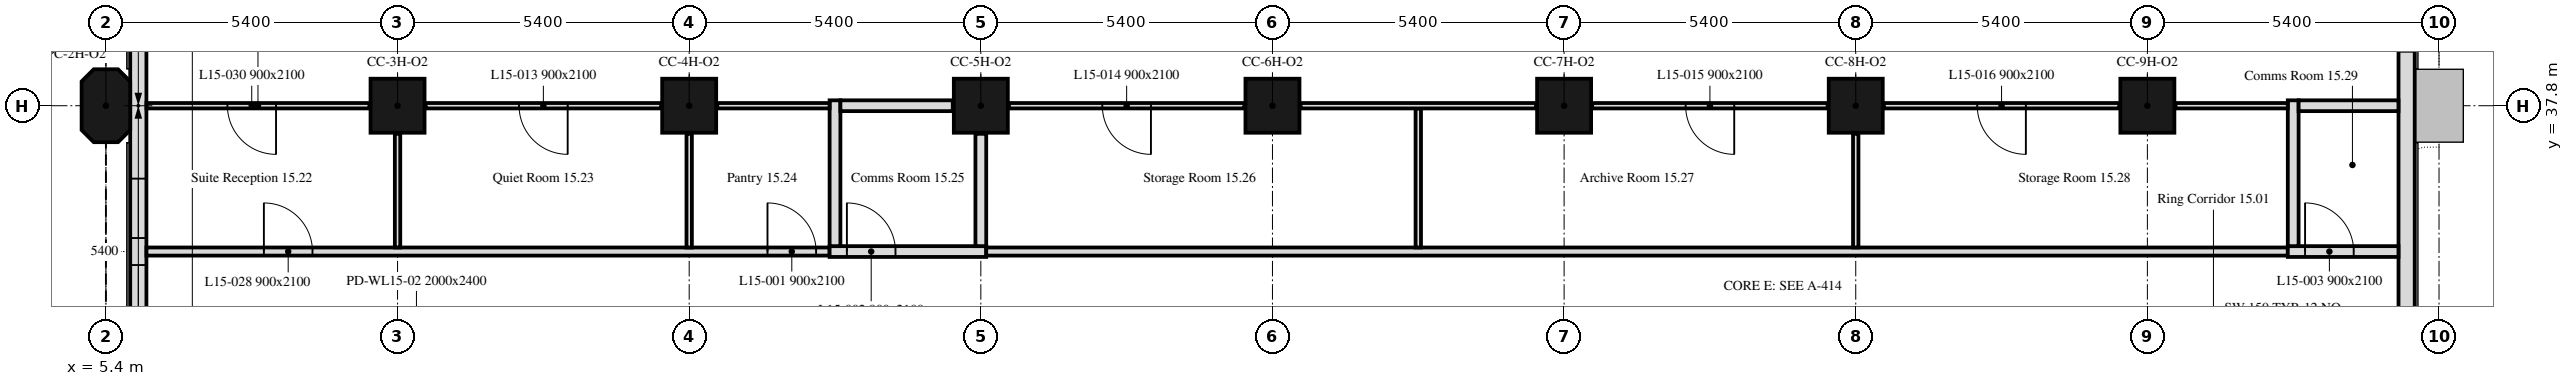
"""IFC4 building model, lengths in metres.
Left out: names, types, materials, properties, quantities, classifications, styles, units other than length and angle.
Written with IfcOpenShell. Run it as: python <this file> out.ifc"""

import sys

from ifc_helpers import new_model, si_unit, direction, frame, frame_2d, origin, origin_2d, place, context, subcontext, project, spatial, polyline, rectangle, outline, extrude, element, fill, save


model = new_model("IFC4")
c1 = context("Model", 3, precision=1e-05, world=origin(), true_north=direction((0.0, 1.0)))
c2 = subcontext(c1, "Body", "Model", "MODEL_VIEW")
j1 = project(units=[si_unit("LENGTHUNIT", "METRE"), si_unit("PLANEANGLEUNIT", "RADIAN")], contexts=[c1])
p1 = place(None, origin())
s1 = spatial("IfcSite", under=j1, at=p1, CompositionType="ELEMENT")
p2 = place(p1, origin())
s2 = spatial("IfcBuilding", under=s1, at=p2, CompositionType="ELEMENT")
p3 = place(p2, frame((0.0, 0.0, 68.8)))
s3 = spatial("IfcBuildingStorey", under=s2, at=p3, CompositionType="ELEMENT", Elevation=68.8)
p4 = place(p3, frame((5.4, 37.8, 0.0), z_axis=(0.0, 0.0, 1.0), x_axis=(0.0, 1.0, 0.0)))
e1 = element("IfcColumn", 1, at=p4, inside=s3, PredefinedType="COLUMN", context=c2, shape_type="SweptSolid", body=[
    extrude(outline(polyline([(-0.45, -0.45), (0.45, -0.45), (0.675, -0.225), (0.675, 0.225), (0.45, 0.45), (-0.45, 0.45), (-0.675, 0.225), (-0.675, -0.225), (-0.45, -0.45)])), origin(), (0.0, 0.0, 1.0), 3.5),
])
for number, where, z_axis, x_axis in (
    (2, (10.8, 37.8, 0.0), (0.0, 0.0, 1.0), (1.0, 0.0, 0.0)),
    (3, (16.2, 37.8, 0.0), (0.0, 0.0, 1.0), (1.0, 0.0, 0.0)),
    (4, (21.6, 37.8, 0.0), (0.0, 0.0, 1.0), (1.0, 0.0, 0.0)),
    (5, (27.0, 37.8, 0.0), (0.0, 0.0, 1.0), (1.0, 0.0, 0.0)),
    (6, (32.4, 37.8, 0.0), (0.0, 0.0, 1.0), (1.0, 0.0, 0.0)),
    (7, (37.8, 37.8, 0.0), (0.0, 0.0, 1.0), (1.0, 0.0, 0.0)),
    (8, (43.2, 37.8, 0.0), (0.0, 0.0, 1.0), (1.0, 0.0, 0.0)),
):
    element("IfcColumn", number, at=place(p3, frame(where, z_axis=z_axis, x_axis=x_axis)), inside=s3, PredefinedType="COLUMN", context=c2, shape_type="SweptSolid", body=[
        extrude(rectangle(XDim=1.0, YDim=1.0, at=origin_2d()), origin(), (0.0, 0.0, 1.0), 3.5),
    ])
p5 = place(p3, frame((48.0, 10.986, 0.0), z_axis=(0.0, 0.0, 1.0), x_axis=(0.0, 1.0, 0.0)))
e9 = element("IfcWall", 9, at=p5, inside=s3, PredefinedType="SOLIDWALL", context=c2, shape_type="SweptSolid", body=[
    extrude(rectangle(XDim=32.027, YDim=0.3, at=frame_2d((16.014, 0.0))), origin(), (0.0, 0.0, 1.0), 3.5),
])
p6 = place(p5, frame((27.814, 0.0, 0.9)))
e10 = element("IfcOpeningElement", 10, at=p6, cuts=e9, PredefinedType="OPENING", context=c2, shape_type="SweptSolid", body=[
    extrude(rectangle(XDim=3.4, YDim=1.7, at=frame_2d((1.7, 0.85))), frame((0.0, 0.16, 0.0), z_axis=(0.0, -1.0, 0.0), x_axis=(1.0, 0.0, 0.0)), (0.0, 0.0, 1.0), 0.32),
])
p7 = place(p3, frame((6.0, 43.014, 0.0), z_axis=(0.0, 0.0, 1.0), x_axis=(0.0, -1.0, 0.0)))
e11 = element("IfcWall", 11, at=p7, inside=s3, PredefinedType="SOLIDWALL", context=c2, shape_type="SweptSolid", body=[
    extrude(rectangle(XDim=10.614, YDim=0.3, at=frame_2d((5.307, 0.0))), origin(), (0.0, 0.0, 1.0), 3.5),
])
p8 = place(p7, frame((6.564, 0.0, 0.9)))
e12 = element("IfcOpeningElement", 12, at=p8, cuts=e11, PredefinedType="OPENING", context=c2, shape_type="SweptSolid", body=[
    extrude(rectangle(XDim=1.1, YDim=1.7, at=frame_2d((0.55, 0.85))), frame((0.0, 0.16, 0.0), z_axis=(0.0, -1.0, 0.0), x_axis=(1.0, 0.0, 0.0)), (0.0, 0.0, 1.0), 0.32),
])
p9 = place(p7, frame((8.164, 0.0, 0.9)))
e13 = element("IfcOpeningElement", 13, at=p9, cuts=e11, PredefinedType="OPENING", context=c2, shape_type="SweptSolid", body=[
    extrude(rectangle(XDim=1.1, YDim=1.7, at=frame_2d((0.55, 0.85))), frame((0.0, 0.16, 0.0), z_axis=(0.0, -1.0, 0.0), x_axis=(1.0, 0.0, 0.0)), (0.0, 0.0, 1.0), 0.32),
])
p10 = place(p3, frame((6.151, 35.1, 0.0), z_axis=(0.0, 0.0, 1.0), x_axis=(1.0, 0.0, 0.0)))
e14 = element("IfcWall", 14, at=p10, inside=s3, PredefinedType="PARTITIONING", context=c2, shape_type="SweptSolid", body=[
    extrude(rectangle(XDim=12.649, YDim=0.15, at=frame_2d((6.325, 0.0))), origin(), (0.0, 0.0, 1.0), 2.75),
])
p11 = place(p10, frame((11.499, 0.0, 0.0)))
e15 = element("IfcOpeningElement", 15, at=p11, cuts=e14, PredefinedType="OPENING", context=c2, shape_type="SweptSolid", body=[
    extrude(rectangle(XDim=0.9, YDim=2.1, at=frame_2d((0.45, 1.05))), frame((0.0, 0.075, 0.0), z_axis=(0.0, -1.0, 0.0), x_axis=(1.0, 0.0, 0.0)), (0.0, 0.0, 1.0), 0.15),
])
p12 = place(p10, frame((2.174, 0.0, 0.0)))
e16 = element("IfcOpeningElement", 16, at=p12, cuts=e14, PredefinedType="OPENING", context=c2, shape_type="SweptSolid", body=[
    extrude(rectangle(XDim=0.9, YDim=2.1, at=frame_2d((0.45, 1.05))), frame((0.0, 0.075, 0.0), z_axis=(0.0, -1.0, 0.0), x_axis=(1.0, 0.0, 0.0)), (0.0, 0.0, 1.0), 0.15),
])
p13 = place(p3, frame((18.8, 35.1, 0.0), z_axis=(0.0, 0.0, 1.0), x_axis=(1.0, 0.0, 0.0)))
e17 = element("IfcWall", 17, at=p13, inside=s3, PredefinedType="PARTITIONING", context=c2, shape_type="SweptSolid", body=[
    extrude(rectangle(XDim=2.9, YDim=0.2, at=frame_2d((1.45, 0.0))), origin(), (0.0, 0.0, 1.0), 2.75),
])
p14 = place(p13, frame((0.32, 0.0, 0.0)))
e18 = element("IfcOpeningElement", 18, at=p14, cuts=e17, PredefinedType="OPENING", context=c2, shape_type="SweptSolid", body=[
    extrude(rectangle(XDim=0.9, YDim=2.1, at=frame_2d((0.45, 1.05))), frame((0.0, 0.1, 0.0), z_axis=(0.0, -1.0, 0.0), x_axis=(1.0, 0.0, 0.0)), (0.0, 0.0, 1.0), 0.2),
])
p15 = place(p3, frame((21.7, 35.1, 0.0), z_axis=(0.0, 0.0, 1.0), x_axis=(1.0, 0.0, 0.0)))
e19 = element("IfcWall", 19, at=p15, inside=s3, PredefinedType="PARTITIONING", context=c2, shape_type="SweptSolid", body=[
    extrude(rectangle(XDim=24.1, YDim=0.15, at=frame_2d((12.05, 0.0))), origin(), (0.0, 0.0, 1.0), 2.75),
])
p16 = place(p3, frame((45.8, 35.1, 0.0), z_axis=(0.0, 0.0, 1.0), x_axis=(1.0, 0.0, 0.0)))
e20 = element("IfcWall", 20, at=p16, inside=s3, PredefinedType="PARTITIONING", context=c2, shape_type="SweptSolid", body=[
    extrude(rectangle(XDim=2.049, YDim=0.2, at=frame_2d((1.024, 0.0))), origin(), (0.0, 0.0, 1.0), 3.5),
])
p17 = place(p16, frame((0.32, 0.0, 0.0)))
e21 = element("IfcOpeningElement", 21, at=p17, cuts=e20, PredefinedType="OPENING", context=c2, shape_type="SweptSolid", body=[
    extrude(rectangle(XDim=0.9, YDim=2.1, at=frame_2d((0.45, 1.05))), frame((0.0, 0.1, 0.0), z_axis=(0.0, -1.0, 0.0), x_axis=(1.0, 0.0, 0.0)), (0.0, 0.0, 1.0), 0.2),
])
p18 = place(p3, frame((10.28, 37.8, 0.0), z_axis=(0.0, 0.0, 1.0), x_axis=(-1.0, 0.0, 0.0)))
e22 = element("IfcWall", 22, at=p18, inside=s3, PredefinedType="PARTITIONING", context=c2, shape_type="SweptSolid", body=[
    extrude(rectangle(XDim=4.129, YDim=0.1, at=frame_2d((2.064, 0.0))), origin(), (0.0, 0.0, 1.0), 3.5),
])
p19 = place(p18, frame((1.73, 0.0, 0.0)))
e23 = element("IfcOpeningElement", 23, at=p19, cuts=e22, PredefinedType="OPENING", context=c2, shape_type="SweptSolid", body=[
    extrude(rectangle(XDim=0.9, YDim=2.1, at=frame_2d((0.45, 1.05))), frame((0.0, 0.05, 0.0), z_axis=(0.0, -1.0, 0.0), x_axis=(1.0, 0.0, 0.0)), (0.0, 0.0, 1.0), 0.1),
])
p20 = place(p3, frame((10.8, 35.175, 0.0), z_axis=(0.0, 0.0, 1.0), x_axis=(0.0, 1.0, 0.0)))
e24 = element("IfcWall", 24, at=p20, inside=s3, PredefinedType="PARTITIONING", context=c2, shape_type="SweptSolid", body=[
    extrude(rectangle(XDim=2.105, YDim=0.1, at=frame_2d((1.052, 0.0))), origin(), (0.0, 0.0, 1.0), 3.5),
])
p21 = place(p3, frame((16.2, 35.175, 0.0), z_axis=(0.0, 0.0, 1.0), x_axis=(0.0, 1.0, 0.0)))
e25 = element("IfcWall", 25, at=p21, inside=s3, PredefinedType="PARTITIONING", context=c2, shape_type="SweptSolid", body=[
    extrude(rectangle(XDim=2.105, YDim=0.1, at=frame_2d((1.052, 0.0))), origin(), (0.0, 0.0, 1.0), 2.75),
])
p22 = place(p3, frame((15.68, 37.8, 0.0), z_axis=(0.0, 0.0, 1.0), x_axis=(-1.0, 0.0, 0.0)))
e26 = element("IfcWall", 26, at=p22, inside=s3, PredefinedType="PARTITIONING", context=c2, shape_type="SweptSolid", body=[
    extrude(rectangle(XDim=4.36, YDim=0.1, at=frame_2d((2.18, 0.0))), origin(), (0.0, 0.0, 1.0), 3.5),
])
p23 = place(p22, frame((1.73, 0.0, 0.0)))
e27 = element("IfcOpeningElement", 27, at=p23, cuts=e26, PredefinedType="OPENING", context=c2, shape_type="SweptSolid", body=[
    extrude(rectangle(XDim=0.9, YDim=2.1, at=frame_2d((0.45, 1.05))), frame((0.0, 0.05, 0.0), z_axis=(0.0, -1.0, 0.0), x_axis=(1.0, 0.0, 0.0)), (0.0, 0.0, 1.0), 0.1),
])
p24 = place(p3, frame((18.9, 35.2, 0.0), z_axis=(0.0, 0.0, 1.0), x_axis=(0.0, 1.0, 0.0)))
e28 = element("IfcWall", 28, at=p24, inside=s3, PredefinedType="PARTITIONING", context=c2, shape_type="SweptSolid", body=[
    extrude(rectangle(XDim=2.7, YDim=0.2, at=frame_2d((1.35, 0.0))), origin(), (0.0, 0.0, 1.0), 3.5),
])
p25 = place(p3, frame((18.8, 37.8, 0.0), z_axis=(0.0, 0.0, 1.0), x_axis=(-1.0, 0.0, 0.0)))
e29 = element("IfcWall", 29, at=p25, inside=s3, PredefinedType="PARTITIONING", context=c2, shape_type="SweptSolid", body=[
    extrude(rectangle(XDim=2.08, YDim=0.1, at=frame_2d((1.04, 0.0))), origin(), (0.0, 0.0, 1.0), 3.5),
])
p26 = place(p3, frame((21.6, 35.2, 0.0), z_axis=(0.0, 0.0, 1.0), x_axis=(0.0, 1.0, 0.0)))
e30 = element("IfcWall", 30, at=p26, inside=s3, PredefinedType="PARTITIONING", context=c2, shape_type="SweptSolid", body=[
    extrude(rectangle(XDim=2.08, YDim=0.2, at=frame_2d((1.04, 0.0))), origin(), (0.0, 0.0, 1.0), 2.75),
])
p27 = place(p3, frame((21.08, 37.8, 0.0), z_axis=(0.0, 0.0, 1.0), x_axis=(-1.0, 0.0, 0.0)))
e31 = element("IfcWall", 31, at=p27, inside=s3, PredefinedType="PARTITIONING", context=c2, shape_type="SweptSolid", body=[
    extrude(rectangle(XDim=2.08, YDim=0.2, at=frame_2d((1.04, 0.0))), origin(), (0.0, 0.0, 1.0), 3.5),
])
p28 = place(p3, frame((29.7, 35.175, 0.0), z_axis=(0.0, 0.0, 1.0), x_axis=(0.0, 1.0, 0.0)))
e32 = element("IfcWall", 32, at=p28, inside=s3, PredefinedType="PARTITIONING", context=c2, shape_type="SweptSolid", body=[
    extrude(rectangle(XDim=2.575, YDim=0.1, at=frame_2d((1.288, 0.0))), origin(), (0.0, 0.0, 1.0), 3.5),
])
p29 = place(p3, frame((26.48, 37.8, 0.0), z_axis=(0.0, 0.0, 1.0), x_axis=(-1.0, 0.0, 0.0)))
e33 = element("IfcWall", 33, at=p29, inside=s3, PredefinedType="PARTITIONING", context=c2, shape_type="SweptSolid", body=[
    extrude(rectangle(XDim=4.36, YDim=0.1, at=frame_2d((2.18, 0.0))), origin(), (0.0, 0.0, 1.0), 3.5),
])
p30 = place(p29, frame((1.73, 0.0, 0.0)))
e34 = element("IfcOpeningElement", 34, at=p30, cuts=e33, PredefinedType="OPENING", context=c2, shape_type="SweptSolid", body=[
    extrude(rectangle(XDim=0.9, YDim=2.1, at=frame_2d((0.45, 1.05))), frame((0.0, 0.05, 0.0), z_axis=(0.0, -1.0, 0.0), x_axis=(1.0, 0.0, 0.0)), (0.0, 0.0, 1.0), 0.1),
])
p31 = place(p3, frame((37.8, 35.175, 0.0), z_axis=(0.0, 0.0, 1.0), x_axis=(0.0, 1.0, 0.0)))
e35 = element("IfcWall", 35, at=p31, inside=s3, PredefinedType="PARTITIONING", context=c2, shape_type="SweptSolid", body=[
    extrude(rectangle(XDim=2.105, YDim=0.1, at=frame_2d((1.052, 0.0))), origin(), (0.0, 0.0, 1.0), 2.75),
])
p32 = place(p3, frame((37.28, 37.8, 0.0), z_axis=(0.0, 0.0, 1.0), x_axis=(-1.0, 0.0, 0.0)))
e36 = element("IfcWall", 36, at=p32, inside=s3, PredefinedType="PARTITIONING", context=c2, shape_type="SweptSolid", body=[
    extrude(rectangle(XDim=4.36, YDim=0.1, at=frame_2d((2.18, 0.0))), origin(), (0.0, 0.0, 1.0), 2.75),
])
p33 = place(p32, frame((1.73, 0.0, 0.0)))
e37 = element("IfcOpeningElement", 37, at=p33, cuts=e36, PredefinedType="OPENING", context=c2, shape_type="SweptSolid", body=[
    extrude(rectangle(XDim=0.9, YDim=2.1, at=frame_2d((0.45, 1.05))), frame((0.0, 0.05, 0.0), z_axis=(0.0, -1.0, 0.0), x_axis=(1.0, 0.0, 0.0)), (0.0, 0.0, 1.0), 0.1),
])
p34 = place(p3, frame((31.88, 37.8, 0.0), z_axis=(0.0, 0.0, 1.0), x_axis=(-1.0, 0.0, 0.0)))
e38 = element("IfcWall", 38, at=p34, inside=s3, PredefinedType="PARTITIONING", context=c2, shape_type="SweptSolid", body=[
    extrude(rectangle(XDim=4.36, YDim=0.1, at=frame_2d((2.18, 0.0))), origin(), (0.0, 0.0, 1.0), 3.5),
])
p35 = place(p3, frame((45.9, 35.2, 0.0), z_axis=(0.0, 0.0, 1.0), x_axis=(0.0, 1.0, 0.0)))
e39 = element("IfcWall", 39, at=p35, inside=s3, PredefinedType="PARTITIONING", context=c2, shape_type="SweptSolid", body=[
    extrude(rectangle(XDim=2.7, YDim=0.2, at=frame_2d((1.35, 0.0))), origin(), (0.0, 0.0, 1.0), 2.75),
])
p36 = place(p3, frame((45.8, 37.8, 0.0), z_axis=(0.0, 0.0, 1.0), x_axis=(-1.0, 0.0, 0.0)))
e40 = element("IfcWall", 40, at=p36, inside=s3, PredefinedType="PARTITIONING", context=c2, shape_type="SweptSolid", body=[
    extrude(rectangle(XDim=2.08, YDim=0.1, at=frame_2d((1.04, 0.0))), origin(), (0.0, 0.0, 1.0), 2.75),
])
p37 = place(p3, frame((42.68, 37.8, 0.0), z_axis=(0.0, 0.0, 1.0), x_axis=(-1.0, 0.0, 0.0)))
e41 = element("IfcWall", 41, at=p37, inside=s3, PredefinedType="PARTITIONING", context=c2, shape_type="SweptSolid", body=[
    extrude(rectangle(XDim=4.36, YDim=0.1, at=frame_2d((2.18, 0.0))), origin(), (0.0, 0.0, 1.0), 2.75),
])
p38 = place(p37, frame((1.73, 0.0, 0.0)))
e42 = element("IfcOpeningElement", 42, at=p38, cuts=e41, PredefinedType="OPENING", context=c2, shape_type="SweptSolid", body=[
    extrude(rectangle(XDim=0.9, YDim=2.1, at=frame_2d((0.45, 1.05))), frame((0.0, 0.05, 0.0), z_axis=(0.0, -1.0, 0.0), x_axis=(1.0, 0.0, 0.0)), (0.0, 0.0, 1.0), 0.1),
])
p39 = place(p3, frame((46.0, 37.8, 0.0), z_axis=(0.0, 0.0, 1.0), x_axis=(1.0, 0.0, 0.0)))
e43 = element("IfcWall", 43, at=p39, inside=s3, PredefinedType="PARTITIONING", context=c2, shape_type="SweptSolid", body=[
    extrude(rectangle(XDim=1.849, YDim=0.2, at=frame_2d((0.925, 0.0))), origin(), (0.0, 0.0, 1.0), 2.75),
])
p40 = place(p8, origin())
e44 = element("IfcWindow", 44, at=p40, inside=s3, PartitioningType="SINGLE_PANEL", PredefinedType="WINDOW", context=c2, shape_type="SweptSolid", body=[
    extrude(rectangle(XDim=1.1, YDim=1.7, at=frame_2d((0.55, 0.85))), frame((0.0, 0.03, 0.0), z_axis=(0.0, -1.0, 0.0), x_axis=(1.0, 0.0, 0.0)), (0.0, 0.0, 1.0), 0.06),
])
fill(e12, e44)
p41 = place(p9, origin())
e45 = element("IfcWindow", 45, at=p41, inside=s3, PartitioningType="SINGLE_PANEL", PredefinedType="WINDOW", context=c2, shape_type="SweptSolid", body=[
    extrude(rectangle(XDim=1.1, YDim=1.7, at=frame_2d((0.55, 0.85))), frame((0.0, 0.03, 0.0), z_axis=(0.0, -1.0, 0.0), x_axis=(1.0, 0.0, 0.0)), (0.0, 0.0, 1.0), 0.06),
])
fill(e13, e45)
p42 = place(p11, origin())
e46 = element("IfcDoor", 46, at=p42, inside=s3, OperationType="SINGLE_SWING_LEFT", PredefinedType="DOOR", context=c2, shape_type="SweptSolid", body=[
    extrude(rectangle(XDim=0.9, YDim=2.1, at=frame_2d((0.45, 1.05))), frame((0.0, 0.025, 0.0), z_axis=(0.0, -1.0, 0.0), x_axis=(1.0, 0.0, 0.0)), (0.0, 0.0, 1.0), 0.05),
])
fill(e15, e46)
p43 = place(p14, origin())
e47 = element("IfcDoor", 47, at=p43, inside=s3, OperationType="SINGLE_SWING_LEFT", PredefinedType="DOOR", context=c2, shape_type="SweptSolid", body=[
    extrude(rectangle(XDim=0.9, YDim=2.1, at=frame_2d((0.45, 1.05))), frame((0.0, 0.025, 0.0), z_axis=(0.0, -1.0, 0.0), x_axis=(1.0, 0.0, 0.0)), (0.0, 0.0, 1.0), 0.05),
])
fill(e18, e47)
p44 = place(p17, origin())
e48 = element("IfcDoor", 48, at=p44, inside=s3, OperationType="SINGLE_SWING_RIGHT", PredefinedType="DOOR", context=c2, shape_type="SweptSolid", body=[
    extrude(rectangle(XDim=0.9, YDim=2.1, at=frame_2d((0.45, 1.05))), frame((0.0, 0.025, 0.0), z_axis=(0.0, -1.0, 0.0), x_axis=(1.0, 0.0, 0.0)), (0.0, 0.0, 1.0), 0.05),
])
fill(e21, e48)
p45 = place(p23, origin())
e49 = element("IfcDoor", 49, at=p45, inside=s3, OperationType="SINGLE_SWING_RIGHT", PredefinedType="DOOR", context=c2, shape_type="SweptSolid", body=[
    extrude(rectangle(XDim=0.9, YDim=2.1, at=frame_2d((0.45, 1.05))), frame((0.0, 0.025, 0.0), z_axis=(0.0, -1.0, 0.0), x_axis=(1.0, 0.0, 0.0)), (0.0, 0.0, 1.0), 0.05),
])
fill(e27, e49)
p46 = place(p30, origin())
e50 = element("IfcDoor", 50, at=p46, inside=s3, OperationType="SINGLE_SWING_RIGHT", PredefinedType="DOOR", context=c2, shape_type="SweptSolid", body=[
    extrude(rectangle(XDim=0.9, YDim=2.1, at=frame_2d((0.45, 1.05))), frame((0.0, 0.025, 0.0), z_axis=(0.0, -1.0, 0.0), x_axis=(1.0, 0.0, 0.0)), (0.0, 0.0, 1.0), 0.05),
])
fill(e34, e50)
p47 = place(p33, origin())
e51 = element("IfcDoor", 51, at=p47, inside=s3, OperationType="SINGLE_SWING_LEFT", PredefinedType="DOOR", context=c2, shape_type="SweptSolid", body=[
    extrude(rectangle(XDim=0.9, YDim=2.1, at=frame_2d((0.45, 1.05))), frame((0.0, 0.025, 0.0), z_axis=(0.0, -1.0, 0.0), x_axis=(1.0, 0.0, 0.0)), (0.0, 0.0, 1.0), 0.05),
])
fill(e37, e51)
p48 = place(p38, origin())
e52 = element("IfcDoor", 52, at=p48, inside=s3, OperationType="SINGLE_SWING_LEFT", PredefinedType="DOOR", context=c2, shape_type="SweptSolid", body=[
    extrude(rectangle(XDim=0.9, YDim=2.1, at=frame_2d((0.45, 1.05))), frame((0.0, 0.025, 0.0), z_axis=(0.0, -1.0, 0.0), x_axis=(1.0, 0.0, 0.0)), (0.0, 0.0, 1.0), 0.05),
])
fill(e42, e52)
p49 = place(p12, origin())
e53 = element("IfcDoor", 53, at=p49, inside=s3, OperationType="SINGLE_SWING_LEFT", PredefinedType="DOOR", context=c2, shape_type="SweptSolid", body=[
    extrude(rectangle(XDim=0.9, YDim=2.1, at=frame_2d((0.45, 1.05))), frame((0.0, 0.025, 0.0), z_axis=(0.0, -1.0, 0.0), x_axis=(1.0, 0.0, 0.0)), (0.0, 0.0, 1.0), 0.05),
])
fill(e16, e53)
p50 = place(p19, origin())
e54 = element("IfcDoor", 54, at=p50, inside=s3, OperationType="SINGLE_SWING_LEFT", PredefinedType="DOOR", context=c2, shape_type="SweptSolid", body=[
    extrude(rectangle(XDim=0.9, YDim=2.1, at=frame_2d((0.45, 1.05))), frame((0.0, 0.025, 0.0), z_axis=(0.0, -1.0, 0.0), x_axis=(1.0, 0.0, 0.0)), (0.0, 0.0, 1.0), 0.05),
])
fill(e23, e54)
save(model, sys.argv[1])
